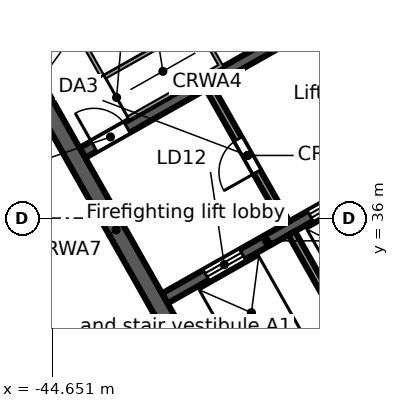
"""IFC4 building model, lengths in metres.
Left out: names, types, materials, properties, quantities, classifications, styles, units other than length and angle.
Written with IfcOpenShell. Run it as: python <this file> out.ifc"""

import sys

from ifc_helpers import new_model, si_unit, direction, frame, frame_2d, origin, place, context, subcontext, project, spatial, rectangle, extrude, element, fill, save


model = new_model("IFC4")
c1 = context("Model", 3, precision=1e-05, world=origin(), true_north=direction((0.0, 1.0)))
c2 = subcontext(c1, "Body", "Model", "MODEL_VIEW")
j1 = project(units=[si_unit("LENGTHUNIT", "METRE"), si_unit("PLANEANGLEUNIT", "RADIAN")], contexts=[c1])
p1 = place(None, origin())
s1 = spatial("IfcSite", under=j1, at=p1, CompositionType="ELEMENT")
p2 = place(p1, origin())
s2 = spatial("IfcBuilding", under=s1, at=p2, CompositionType="ELEMENT")
p3 = place(p2, frame((0.0, 0.0, 254.3)))
s3 = spatial("IfcBuildingStorey", under=s2, at=p3, CompositionType="ELEMENT", Elevation=254.3)
p4 = place(p3, frame((-0.046, 47.974, 0.0), z_axis=(0.0, 0.0, 1.0), x_axis=(-0.870356579543, -0.492421998337, 0.0)))
e1 = element("IfcWall", 1, at=p4, inside=s3, PredefinedType="STANDARD", context=c2, shape_type="SweptSolid", body=[
    extrude(rectangle(XDim=43.754, YDim=0.25, at=frame_2d((21.877, 0.0))), origin(), (0.0, 0.0, 1.0), 3.55),
])
p5 = place(p4, frame((41.061, 0.0, 0.8)))
e2 = element("IfcOpeningElement", 2, at=p5, cuts=e1, PredefinedType="OPENING", context=c2, shape_type="SweptSolid", body=[
    extrude(rectangle(XDim=2.4, YDim=2.2, at=frame_2d((1.2, 1.1))), frame((0.0, 0.135, 0.0), z_axis=(0.0, -1.0, 0.0), x_axis=(1.0, 0.0, 0.0)), (0.0, 0.0, 1.0), 0.27),
])
p6 = place(p4, frame((38.443, 0.0, 0.0)))
e3 = element("IfcOpeningElement", 3, at=p6, cuts=e1, PredefinedType="OPENING", context=c2, shape_type="SweptSolid", body=[
    extrude(rectangle(XDim=1.8, YDim=2.4, at=frame_2d((0.9, 1.2))), frame((0.0, 0.135, 0.0), z_axis=(0.0, -1.0, 0.0), x_axis=(1.0, 0.0, 0.0)), (0.0, 0.0, 1.0), 0.27),
])
p7 = place(p4, frame((35.225, 0.0, 0.8)))
e4 = element("IfcOpeningElement", 4, at=p7, cuts=e1, PredefinedType="OPENING", context=c2, shape_type="SweptSolid", body=[
    extrude(rectangle(XDim=2.4, YDim=2.2, at=frame_2d((1.2, 1.1))), frame((0.0, 0.135, 0.0), z_axis=(0.0, -1.0, 0.0), x_axis=(1.0, 0.0, 0.0)), (0.0, 0.0, 1.0), 0.27),
])
p8 = place(p4, frame((32.307, 0.0, 0.8)))
e5 = element("IfcOpeningElement", 5, at=p8, cuts=e1, PredefinedType="OPENING", context=c2, shape_type="SweptSolid", body=[
    extrude(rectangle(XDim=2.4, YDim=2.2, at=frame_2d((1.2, 1.1))), frame((0.0, 0.135, 0.0), z_axis=(0.0, -1.0, 0.0), x_axis=(1.0, 0.0, 0.0)), (0.0, 0.0, 1.0), 0.27),
])
p9 = place(p4, frame((29.688, 0.0, 0.0)))
e6 = element("IfcOpeningElement", 6, at=p9, cuts=e1, PredefinedType="OPENING", context=c2, shape_type="SweptSolid", body=[
    extrude(rectangle(XDim=1.8, YDim=2.4, at=frame_2d((0.9, 1.2))), frame((0.0, 0.135, 0.0), z_axis=(0.0, -1.0, 0.0), x_axis=(1.0, 0.0, 0.0)), (0.0, 0.0, 1.0), 0.27),
])
p10 = place(p4, frame((26.47, 0.0, 0.8)))
e7 = element("IfcOpeningElement", 7, at=p10, cuts=e1, PredefinedType="OPENING", context=c2, shape_type="SweptSolid", body=[
    extrude(rectangle(XDim=2.4, YDim=2.2, at=frame_2d((1.2, 1.1))), frame((0.0, 0.135, 0.0), z_axis=(0.0, -1.0, 0.0), x_axis=(1.0, 0.0, 0.0)), (0.0, 0.0, 1.0), 0.27),
])
p11 = place(p4, frame((23.552, 0.0, 0.8)))
e8 = element("IfcOpeningElement", 8, at=p11, cuts=e1, PredefinedType="OPENING", context=c2, shape_type="SweptSolid", body=[
    extrude(rectangle(XDim=2.4, YDim=2.2, at=frame_2d((1.2, 1.1))), frame((0.0, 0.135, 0.0), z_axis=(0.0, -1.0, 0.0), x_axis=(1.0, 0.0, 0.0)), (0.0, 0.0, 1.0), 0.27),
])
p12 = place(p4, frame((20.934, 0.0, 0.0)))
e9 = element("IfcOpeningElement", 9, at=p12, cuts=e1, PredefinedType="OPENING", context=c2, shape_type="SweptSolid", body=[
    extrude(rectangle(XDim=1.8, YDim=2.4, at=frame_2d((0.9, 1.2))), frame((0.0, 0.135, 0.0), z_axis=(0.0, -1.0, 0.0), x_axis=(1.0, 0.0, 0.0)), (0.0, 0.0, 1.0), 0.27),
])
p13 = place(p4, frame((17.716, 0.0, 0.8)))
e10 = element("IfcOpeningElement", 10, at=p13, cuts=e1, PredefinedType="OPENING", context=c2, shape_type="SweptSolid", body=[
    extrude(rectangle(XDim=2.4, YDim=2.2, at=frame_2d((1.2, 1.1))), frame((0.0, 0.135, 0.0), z_axis=(0.0, -1.0, 0.0), x_axis=(1.0, 0.0, 0.0)), (0.0, 0.0, 1.0), 0.27),
])
p14 = place(p4, frame((14.798, 0.0, 0.8)))
e11 = element("IfcOpeningElement", 11, at=p14, cuts=e1, PredefinedType="OPENING", context=c2, shape_type="SweptSolid", body=[
    extrude(rectangle(XDim=2.4, YDim=2.2, at=frame_2d((1.2, 1.1))), frame((0.0, 0.135, 0.0), z_axis=(0.0, -1.0, 0.0), x_axis=(1.0, 0.0, 0.0)), (0.0, 0.0, 1.0), 0.27),
])
p15 = place(p4, frame((12.179, 0.0, 0.0)))
e12 = element("IfcOpeningElement", 12, at=p15, cuts=e1, PredefinedType="OPENING", context=c2, shape_type="SweptSolid", body=[
    extrude(rectangle(XDim=1.8, YDim=2.4, at=frame_2d((0.9, 1.2))), frame((0.0, 0.135, 0.0), z_axis=(0.0, -1.0, 0.0), x_axis=(1.0, 0.0, 0.0)), (0.0, 0.0, 1.0), 0.27),
])
p16 = place(p4, frame((8.961, 0.0, 0.8)))
e13 = element("IfcOpeningElement", 13, at=p16, cuts=e1, PredefinedType="OPENING", context=c2, shape_type="SweptSolid", body=[
    extrude(rectangle(XDim=2.4, YDim=2.2, at=frame_2d((1.2, 1.1))), frame((0.0, 0.135, 0.0), z_axis=(0.0, -1.0, 0.0), x_axis=(1.0, 0.0, 0.0)), (0.0, 0.0, 1.0), 0.27),
])
p17 = place(p4, frame((6.043, 0.0, 0.8)))
e14 = element("IfcOpeningElement", 14, at=p17, cuts=e1, PredefinedType="OPENING", context=c2, shape_type="SweptSolid", body=[
    extrude(rectangle(XDim=2.4, YDim=2.2, at=frame_2d((1.2, 1.1))), frame((0.0, 0.135, 0.0), z_axis=(0.0, -1.0, 0.0), x_axis=(1.0, 0.0, 0.0)), (0.0, 0.0, 1.0), 0.27),
])
p18 = place(p4, frame((3.425, 0.0, 0.0)))
e15 = element("IfcOpeningElement", 15, at=p18, cuts=e1, PredefinedType="OPENING", context=c2, shape_type="SweptSolid", body=[
    extrude(rectangle(XDim=1.8, YDim=2.4, at=frame_2d((0.9, 1.2))), frame((0.0, 0.135, 0.0), z_axis=(0.0, -1.0, 0.0), x_axis=(1.0, 0.0, 0.0)), (0.0, 0.0, 1.0), 0.27),
])
p19 = place(p4, frame((0.207, 0.0, 0.8)))
e16 = element("IfcOpeningElement", 16, at=p19, cuts=e1, PredefinedType="OPENING", context=c2, shape_type="SweptSolid", body=[
    extrude(rectangle(XDim=2.4, YDim=2.2, at=frame_2d((1.2, 1.1))), frame((0.0, 0.135, 0.0), z_axis=(0.0, -1.0, 0.0), x_axis=(1.0, 0.0, 0.0)), (0.0, 0.0, 1.0), 0.27),
])
p20 = place(p3, frame((-58.732, 38.771, 0.0), z_axis=(0.0, 0.0, 1.0), x_axis=(0.870354824205, 0.492425100887, 0.0)))
e17 = element("IfcWall", 17, at=p20, inside=s3, PredefinedType="STANDARD", context=c2, shape_type="SweptSolid", body=[
    extrude(rectangle(XDim=64.006, YDim=0.25, at=frame_2d((32.003, 0.0))), origin(), (0.0, 0.0, 1.0), 3.55),
])
p21 = place(p20, frame((61.259, 0.0, 0.8)))
e18 = element("IfcOpeningElement", 18, at=p21, cuts=e17, PredefinedType="OPENING", context=c2, shape_type="SweptSolid", body=[
    extrude(rectangle(XDim=2.4, YDim=2.2, at=frame_2d((1.2, 1.1))), frame((0.0, 0.135, 0.0), z_axis=(0.0, -1.0, 0.0), x_axis=(1.0, 0.0, 0.0)), (0.0, 0.0, 1.0), 0.27),
])
p22 = place(p20, frame((58.216, 0.0, 0.8)))
e19 = element("IfcOpeningElement", 19, at=p22, cuts=e17, PredefinedType="OPENING", context=c2, shape_type="SweptSolid", body=[
    extrude(rectangle(XDim=2.4, YDim=2.2, at=frame_2d((1.2, 1.1))), frame((0.0, 0.135, 0.0), z_axis=(0.0, -1.0, 0.0), x_axis=(1.0, 0.0, 0.0)), (0.0, 0.0, 1.0), 0.27),
])
p23 = place(p20, frame((55.173, 0.0, 0.8)))
e20 = element("IfcOpeningElement", 20, at=p23, cuts=e17, PredefinedType="OPENING", context=c2, shape_type="SweptSolid", body=[
    extrude(rectangle(XDim=2.4, YDim=2.2, at=frame_2d((1.2, 1.1))), frame((0.0, 0.135, 0.0), z_axis=(0.0, -1.0, 0.0), x_axis=(1.0, 0.0, 0.0)), (0.0, 0.0, 1.0), 0.27),
])
p24 = place(p20, frame((52.129, 0.0, 0.8)))
e21 = element("IfcOpeningElement", 21, at=p24, cuts=e17, PredefinedType="OPENING", context=c2, shape_type="SweptSolid", body=[
    extrude(rectangle(XDim=2.4, YDim=2.2, at=frame_2d((1.2, 1.1))), frame((0.0, 0.135, 0.0), z_axis=(0.0, -1.0, 0.0), x_axis=(1.0, 0.0, 0.0)), (0.0, 0.0, 1.0), 0.27),
])
p25 = place(p20, frame((49.086, 0.0, 0.8)))
e22 = element("IfcOpeningElement", 22, at=p25, cuts=e17, PredefinedType="OPENING", context=c2, shape_type="SweptSolid", body=[
    extrude(rectangle(XDim=2.4, YDim=2.2, at=frame_2d((1.2, 1.1))), frame((0.0, 0.135, 0.0), z_axis=(0.0, -1.0, 0.0), x_axis=(1.0, 0.0, 0.0)), (0.0, 0.0, 1.0), 0.27),
])
p26 = place(p20, frame((46.043, 0.0, 0.8)))
e23 = element("IfcOpeningElement", 23, at=p26, cuts=e17, PredefinedType="OPENING", context=c2, shape_type="SweptSolid", body=[
    extrude(rectangle(XDim=2.4, YDim=2.2, at=frame_2d((1.2, 1.1))), frame((0.0, 0.135, 0.0), z_axis=(0.0, -1.0, 0.0), x_axis=(1.0, 0.0, 0.0)), (0.0, 0.0, 1.0), 0.27),
])
p27 = place(p20, frame((43.0, 0.0, 0.8)))
e24 = element("IfcOpeningElement", 24, at=p27, cuts=e17, PredefinedType="OPENING", context=c2, shape_type="SweptSolid", body=[
    extrude(rectangle(XDim=2.4, YDim=2.2, at=frame_2d((1.2, 1.1))), frame((0.0, 0.135, 0.0), z_axis=(0.0, -1.0, 0.0), x_axis=(1.0, 0.0, 0.0)), (0.0, 0.0, 1.0), 0.27),
])
p28 = place(p20, frame((39.956, 0.0, 0.8)))
e25 = element("IfcOpeningElement", 25, at=p28, cuts=e17, PredefinedType="OPENING", context=c2, shape_type="SweptSolid", body=[
    extrude(rectangle(XDim=2.4, YDim=2.2, at=frame_2d((1.2, 1.1))), frame((0.0, 0.135, 0.0), z_axis=(0.0, -1.0, 0.0), x_axis=(1.0, 0.0, 0.0)), (0.0, 0.0, 1.0), 0.27),
])
p29 = place(p20, frame((36.913, 0.0, 0.8)))
e26 = element("IfcOpeningElement", 26, at=p29, cuts=e17, PredefinedType="OPENING", context=c2, shape_type="SweptSolid", body=[
    extrude(rectangle(XDim=2.4, YDim=2.2, at=frame_2d((1.2, 1.1))), frame((0.0, 0.135, 0.0), z_axis=(0.0, -1.0, 0.0), x_axis=(1.0, 0.0, 0.0)), (0.0, 0.0, 1.0), 0.27),
])
p30 = place(p20, frame((33.87, 0.0, 0.8)))
e27 = element("IfcOpeningElement", 27, at=p30, cuts=e17, PredefinedType="OPENING", context=c2, shape_type="SweptSolid", body=[
    extrude(rectangle(XDim=2.4, YDim=2.2, at=frame_2d((1.2, 1.1))), frame((0.0, 0.135, 0.0), z_axis=(0.0, -1.0, 0.0), x_axis=(1.0, 0.0, 0.0)), (0.0, 0.0, 1.0), 0.27),
])
p31 = place(p20, frame((30.826, 0.0, 0.8)))
e28 = element("IfcOpeningElement", 28, at=p31, cuts=e17, PredefinedType="OPENING", context=c2, shape_type="SweptSolid", body=[
    extrude(rectangle(XDim=2.4, YDim=2.2, at=frame_2d((1.2, 1.1))), frame((0.0, 0.135, 0.0), z_axis=(0.0, -1.0, 0.0), x_axis=(1.0, 0.0, 0.0)), (0.0, 0.0, 1.0), 0.27),
])
p32 = place(p20, frame((27.783, 0.0, 0.8)))
e29 = element("IfcOpeningElement", 29, at=p32, cuts=e17, PredefinedType="OPENING", context=c2, shape_type="SweptSolid", body=[
    extrude(rectangle(XDim=2.4, YDim=2.2, at=frame_2d((1.2, 1.1))), frame((0.0, 0.135, 0.0), z_axis=(0.0, -1.0, 0.0), x_axis=(1.0, 0.0, 0.0)), (0.0, 0.0, 1.0), 0.27),
])
p33 = place(p20, frame((24.74, 0.0, 0.8)))
e30 = element("IfcOpeningElement", 30, at=p33, cuts=e17, PredefinedType="OPENING", context=c2, shape_type="SweptSolid", body=[
    extrude(rectangle(XDim=2.4, YDim=2.2, at=frame_2d((1.2, 1.1))), frame((0.0, 0.135, 0.0), z_axis=(0.0, -1.0, 0.0), x_axis=(1.0, 0.0, 0.0)), (0.0, 0.0, 1.0), 0.27),
])
p34 = place(p20, frame((21.696, 0.0, 0.8)))
e31 = element("IfcOpeningElement", 31, at=p34, cuts=e17, PredefinedType="OPENING", context=c2, shape_type="SweptSolid", body=[
    extrude(rectangle(XDim=2.4, YDim=2.2, at=frame_2d((1.2, 1.1))), frame((0.0, 0.135, 0.0), z_axis=(0.0, -1.0, 0.0), x_axis=(1.0, 0.0, 0.0)), (0.0, 0.0, 1.0), 0.27),
])
p35 = place(p20, frame((18.653, 0.0, 0.8)))
e32 = element("IfcOpeningElement", 32, at=p35, cuts=e17, PredefinedType="OPENING", context=c2, shape_type="SweptSolid", body=[
    extrude(rectangle(XDim=2.4, YDim=2.2, at=frame_2d((1.2, 1.1))), frame((0.0, 0.135, 0.0), z_axis=(0.0, -1.0, 0.0), x_axis=(1.0, 0.0, 0.0)), (0.0, 0.0, 1.0), 0.27),
])
p36 = place(p20, frame((15.61, 0.0, 0.8)))
e33 = element("IfcOpeningElement", 33, at=p36, cuts=e17, PredefinedType="OPENING", context=c2, shape_type="SweptSolid", body=[
    extrude(rectangle(XDim=2.4, YDim=2.2, at=frame_2d((1.2, 1.1))), frame((0.0, 0.135, 0.0), z_axis=(0.0, -1.0, 0.0), x_axis=(1.0, 0.0, 0.0)), (0.0, 0.0, 1.0), 0.27),
])
p37 = place(p20, frame((12.567, 0.0, 0.8)))
e34 = element("IfcOpeningElement", 34, at=p37, cuts=e17, PredefinedType="OPENING", context=c2, shape_type="SweptSolid", body=[
    extrude(rectangle(XDim=2.4, YDim=2.2, at=frame_2d((1.2, 1.1))), frame((0.0, 0.135, 0.0), z_axis=(0.0, -1.0, 0.0), x_axis=(1.0, 0.0, 0.0)), (0.0, 0.0, 1.0), 0.27),
])
p38 = place(p20, frame((9.523, 0.0, 0.8)))
e35 = element("IfcOpeningElement", 35, at=p38, cuts=e17, PredefinedType="OPENING", context=c2, shape_type="SweptSolid", body=[
    extrude(rectangle(XDim=2.4, YDim=2.2, at=frame_2d((1.2, 1.1))), frame((0.0, 0.135, 0.0), z_axis=(0.0, -1.0, 0.0), x_axis=(1.0, 0.0, 0.0)), (0.0, 0.0, 1.0), 0.27),
])
p39 = place(p20, frame((6.48, 0.0, 0.8)))
e36 = element("IfcOpeningElement", 36, at=p39, cuts=e17, PredefinedType="OPENING", context=c2, shape_type="SweptSolid", body=[
    extrude(rectangle(XDim=2.4, YDim=2.2, at=frame_2d((1.2, 1.1))), frame((0.0, 0.135, 0.0), z_axis=(0.0, -1.0, 0.0), x_axis=(1.0, 0.0, 0.0)), (0.0, 0.0, 1.0), 0.27),
])
p40 = place(p20, frame((3.437, 0.0, 0.8)))
e37 = element("IfcOpeningElement", 37, at=p40, cuts=e17, PredefinedType="OPENING", context=c2, shape_type="SweptSolid", body=[
    extrude(rectangle(XDim=2.4, YDim=2.2, at=frame_2d((1.2, 1.1))), frame((0.0, 0.135, 0.0), z_axis=(0.0, -1.0, 0.0), x_axis=(1.0, 0.0, 0.0)), (0.0, 0.0, 1.0), 0.27),
])
p41 = place(p20, frame((0.393, 0.0, 0.8)))
e38 = element("IfcOpeningElement", 38, at=p41, cuts=e17, PredefinedType="OPENING", context=c2, shape_type="SweptSolid", body=[
    extrude(rectangle(XDim=2.4, YDim=2.2, at=frame_2d((1.2, 1.1))), frame((0.0, 0.135, 0.0), z_axis=(0.0, -1.0, 0.0), x_axis=(1.0, 0.0, 0.0)), (0.0, 0.0, 1.0), 0.27),
])
p42 = place(p3, frame((-44.115, 26.507, 0.0), z_axis=(0.0, 0.0, 1.0), x_axis=(-0.857166583633, 0.515039268311, 0.0)))
e39 = element("IfcWall", 39, at=p42, inside=s3, PredefinedType="STANDARD", context=c2, shape_type="SweptSolid", body=[
    extrude(rectangle(XDim=17.106, YDim=0.25, at=frame_2d((8.553, 0.0))), origin(), (0.0, 0.0, 1.0), 3.55),
])
p43 = place(p42, frame((14.417, 0.0, 0.8)))
e40 = element("IfcOpeningElement", 40, at=p43, cuts=e39, PredefinedType="OPENING", context=c2, shape_type="SweptSolid", body=[
    extrude(rectangle(XDim=2.4, YDim=2.2, at=frame_2d((1.2, 1.1))), frame((0.0, 0.135, 0.0), z_axis=(0.0, -1.0, 0.0), x_axis=(1.0, 0.0, 0.0)), (0.0, 0.0, 1.0), 0.27),
])
p44 = place(p42, frame((11.584, 0.0, 0.8)))
e41 = element("IfcOpeningElement", 41, at=p44, cuts=e39, PredefinedType="OPENING", context=c2, shape_type="SweptSolid", body=[
    extrude(rectangle(XDim=2.4, YDim=2.2, at=frame_2d((1.2, 1.1))), frame((0.0, 0.135, 0.0), z_axis=(0.0, -1.0, 0.0), x_axis=(1.0, 0.0, 0.0)), (0.0, 0.0, 1.0), 0.27),
])
p45 = place(p42, frame((8.75, 0.0, 0.8)))
e42 = element("IfcOpeningElement", 42, at=p45, cuts=e39, PredefinedType="OPENING", context=c2, shape_type="SweptSolid", body=[
    extrude(rectangle(XDim=2.4, YDim=2.2, at=frame_2d((1.2, 1.1))), frame((0.0, 0.135, 0.0), z_axis=(0.0, -1.0, 0.0), x_axis=(1.0, 0.0, 0.0)), (0.0, 0.0, 1.0), 0.27),
])
p46 = place(p42, frame((5.917, 0.0, 0.8)))
e43 = element("IfcOpeningElement", 43, at=p46, cuts=e39, PredefinedType="OPENING", context=c2, shape_type="SweptSolid", body=[
    extrude(rectangle(XDim=2.4, YDim=2.2, at=frame_2d((1.2, 1.1))), frame((0.0, 0.135, 0.0), z_axis=(0.0, -1.0, 0.0), x_axis=(1.0, 0.0, 0.0)), (0.0, 0.0, 1.0), 0.27),
])
p47 = place(p42, frame((3.084, 0.0, 0.8)))
e44 = element("IfcOpeningElement", 44, at=p47, cuts=e39, PredefinedType="OPENING", context=c2, shape_type="SweptSolid", body=[
    extrude(rectangle(XDim=2.4, YDim=2.2, at=frame_2d((1.2, 1.1))), frame((0.0, 0.135, 0.0), z_axis=(0.0, -1.0, 0.0), x_axis=(1.0, 0.0, 0.0)), (0.0, 0.0, 1.0), 0.27),
])
p48 = place(p42, frame((0.25, 0.0, 0.8)))
e45 = element("IfcOpeningElement", 45, at=p48, cuts=e39, PredefinedType="OPENING", context=c2, shape_type="SweptSolid", body=[
    extrude(rectangle(XDim=2.4, YDim=2.2, at=frame_2d((1.2, 1.1))), frame((0.0, 0.135, 0.0), z_axis=(0.0, -1.0, 0.0), x_axis=(1.0, 0.0, 0.0)), (0.0, 0.0, 1.0), 0.27),
])
p49 = place(p3, frame((-39.825, 29.684, 0.0), z_axis=(0.0, 0.0, 1.0), x_axis=(0.870353598469, 0.492427267353, 0.0)))
e46 = element("IfcWall", 46, at=p49, inside=s3, PredefinedType="SOLIDWALL", context=c2, shape_type="SweptSolid", body=[
    extrude(rectangle(XDim=17.0, YDim=0.45, at=frame_2d((8.5, 0.0))), origin(), (0.0, 0.0, 1.0), 3.55),
])
p50 = place(p49, frame((7.2, 0.0, 0.0)))
e47 = element("IfcOpeningElement", 47, at=p50, cuts=e46, PredefinedType="OPENING", context=c2, shape_type="SweptSolid", body=[
    extrude(rectangle(XDim=1.2, YDim=2.1, at=frame_2d((0.6, 1.05))), frame((0.0, 0.235, 0.0), z_axis=(0.0, -1.0, 0.0), x_axis=(1.0, 0.0, 0.0)), (0.0, 0.0, 1.0), 0.47),
])
p51 = place(p3, frame((-41.687, 33.887, 0.0), z_axis=(0.0, 0.0, 1.0), x_axis=(0.870355736587, 0.49242348826, 0.0)))
e48 = element("IfcWall", 48, at=p51, inside=s3, PredefinedType="SOLIDWALL", context=c2, shape_type="SweptSolid", body=[
    extrude(rectangle(XDim=6.15, YDim=0.3, at=frame_2d((3.075, 0.0))), origin(), (0.0, 0.0, 1.0), 3.55),
])
p52 = place(p51, frame((1.25, 0.0, 0.0)))
e49 = element("IfcOpeningElement", 49, at=p52, cuts=e48, PredefinedType="OPENING", context=c2, shape_type="SweptSolid", body=[
    extrude(rectangle(XDim=1.1, YDim=2.1, at=frame_2d((0.55, 1.05))), frame((0.0, 0.16, 0.0), z_axis=(0.0, -1.0, 0.0), x_axis=(1.0, 0.0, 0.0)), (0.0, 0.0, 1.0), 0.32),
])
p53 = place(p51, frame((4.4, 0.0, 0.0)))
e50 = element("IfcOpeningElement", 50, at=p53, cuts=e48, PredefinedType="OPENING", context=c2, shape_type="SweptSolid", body=[
    extrude(rectangle(XDim=1.1, YDim=2.1, at=frame_2d((0.55, 1.05))), frame((0.0, 0.16, 0.0), z_axis=(0.0, -1.0, 0.0), x_axis=(1.0, 0.0, 0.0)), (0.0, 0.0, 1.0), 0.32),
])
p54 = place(p3, frame((-43.853, 37.717, 0.0), z_axis=(0.0, 0.0, 1.0), x_axis=(0.870360409231, 0.492415229297, 0.0)))
e51 = element("IfcWall", 51, at=p54, inside=s3, PredefinedType="SOLIDWALL", context=c2, shape_type="SweptSolid", body=[
    extrude(rectangle(XDim=7.55, YDim=0.3, at=frame_2d((3.775, 0.0))), origin(), (0.0, 0.0, 1.0), 3.55),
])
p55 = place(p54, frame((0.35, 0.0, 0.0)))
e52 = element("IfcOpeningElement", 52, at=p55, cuts=e51, PredefinedType="OPENING", context=c2, shape_type="SweptSolid", body=[
    extrude(rectangle(XDim=1.0, YDim=2.1, at=frame_2d((0.5, 1.05))), frame((0.0, 0.16, 0.0), z_axis=(0.0, -1.0, 0.0), x_axis=(1.0, 0.0, 0.0)), (0.0, 0.0, 1.0), 0.32),
])
p56 = place(p3, frame((-46.191, 41.392, 0.0), z_axis=(0.0, 0.0, 1.0), x_axis=(0.492421378713, -0.870356930107, 0.0)))
e53 = element("IfcWall", 53, at=p56, inside=s3, PredefinedType="SOLIDWALL", context=c2, shape_type="SweptSolid", body=[
    extrude(rectangle(XDim=13.1, YDim=0.45, at=frame_2d((6.55, 0.0))), origin(), (0.0, 0.0, 1.0), 3.55),
])
p57 = place(p3, frame((-38.349, 35.603, 0.0), z_axis=(0.0, 0.0, 1.0), x_axis=(0.492409653846, -0.870363563575, 0.0)))
e54 = element("IfcWall", 54, at=p57, inside=s3, PredefinedType="SOLIDWALL", context=c2, shape_type="SweptSolid", body=[
    extrude(rectangle(XDim=4.2, YDim=0.2, at=frame_2d((2.1, 0.0))), origin(), (0.0, 0.0, 1.0), 3.55),
])
p58 = place(p3, frame((-40.516, 39.433, 0.0), z_axis=(0.0, 0.0, 1.0), x_axis=(0.492453559952, -0.87033872216, 0.0)))
e55 = element("IfcWall", 55, at=p58, inside=s3, PredefinedType="PARTITIONING", context=c2, shape_type="SweptSolid", body=[
    extrude(rectangle(XDim=4.1, YDim=0.2, at=frame_2d((2.05, 0.0))), origin(), (0.0, 0.0, 1.0), 3.55),
])
p59 = place(p58, frame((1.55, 0.0, 0.0)))
e56 = element("IfcOpeningElement", 56, at=p59, cuts=e55, PredefinedType="OPENING", context=c2, shape_type="SweptSolid", body=[
    extrude(rectangle(XDim=1.0, YDim=2.1, at=frame_2d((0.5, 1.05))), frame((0.0, 0.11, 0.0), z_axis=(0.0, -1.0, 0.0), x_axis=(1.0, 0.0, 0.0)), (0.0, 0.0, 1.0), 0.22),
])
p60 = place(p3, frame((-48.843, 29.494, 0.0), z_axis=(0.0, 0.0, 1.0), x_axis=(0.870384139606, 0.492373282705, 0.0)))
e57 = element("IfcWall", 57, at=p60, inside=s3, PredefinedType="PARTITIONING", context=c2, shape_type="SweptSolid", body=[
    extrude(rectangle(XDim=7.941, YDim=0.125, at=frame_2d((3.971, 0.0))), origin(), (0.0, 0.0, 1.0), 2.73),
])
p61 = place(p60, frame((3.45, 0.0, 0.0)))
e58 = element("IfcOpeningElement", 58, at=p61, cuts=e57, PredefinedType="OPENING", context=c2, shape_type="SweptSolid", body=[
    extrude(rectangle(XDim=0.9, YDim=2.1, at=frame_2d((0.45, 1.05))), frame((0.0, 0.073, 0.0), z_axis=(0.0, -1.0, 0.0), x_axis=(1.0, 0.0, 0.0)), (0.0, 0.0, 1.0), 0.145),
])
p62 = place(p52, origin())
e59 = element("IfcDoor", 59, at=p62, inside=s3, OperationType="DOUBLE_DOOR_SLIDING", PredefinedType="DOOR", context=c2, shape_type="SweptSolid", body=[
    extrude(rectangle(XDim=1.1, YDim=2.1, at=frame_2d((0.55, 1.05))), frame((0.0, 0.025, 0.0), z_axis=(0.0, -1.0, 0.0), x_axis=(1.0, 0.0, 0.0)), (0.0, 0.0, 1.0), 0.05),
])
fill(e49, e59)
p63 = place(p53, origin())
e60 = element("IfcDoor", 60, at=p63, inside=s3, OperationType="DOUBLE_DOOR_SLIDING", PredefinedType="DOOR", context=c2, shape_type="SweptSolid", body=[
    extrude(rectangle(XDim=1.1, YDim=2.1, at=frame_2d((0.55, 1.05))), frame((0.0, 0.025, 0.0), z_axis=(0.0, -1.0, 0.0), x_axis=(1.0, 0.0, 0.0)), (0.0, 0.0, 1.0), 0.05),
])
fill(e50, e60)
p64 = place(p55, origin())
e61 = element("IfcDoor", 61, at=p64, inside=s3, OperationType="SINGLE_SWING_LEFT", PredefinedType="DOOR", context=c2, shape_type="SweptSolid", body=[
    extrude(rectangle(XDim=1.0, YDim=2.1, at=frame_2d((0.5, 1.05))), frame((0.0, 0.025, 0.0), z_axis=(0.0, -1.0, 0.0), x_axis=(1.0, 0.0, 0.0)), (0.0, 0.0, 1.0), 0.05),
])
fill(e52, e61)
p65 = place(p59, frame((1.0, 0.0, 0.0), z_axis=(0.0, 0.0, 1.0), x_axis=(-1.0, 0.0, 0.0)))
e62 = element("IfcDoor", 62, at=p65, inside=s3, OperationType="SINGLE_SWING_LEFT", PredefinedType="DOOR", context=c2, shape_type="SweptSolid", body=[
    extrude(rectangle(XDim=1.0, YDim=2.1, at=frame_2d((0.5, 1.05))), frame((0.0, 0.025, 0.0), z_axis=(0.0, -1.0, 0.0), x_axis=(1.0, 0.0, 0.0)), (0.0, 0.0, 1.0), 0.05),
])
fill(e56, e62)
save(model, sys.argv[1])
